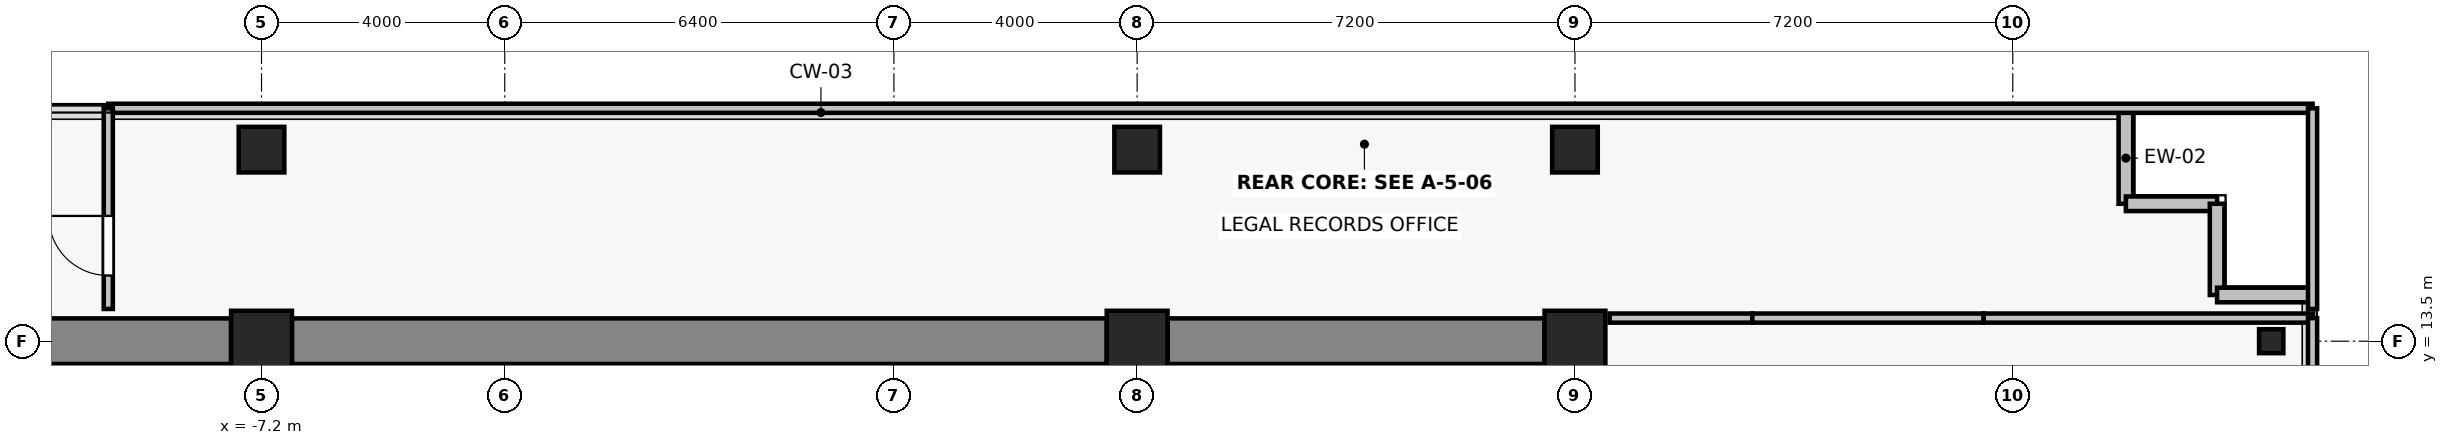
"""IFC4 building model, lengths in metres.
Left out: names, types, materials, properties, quantities, classifications, styles, units other than length and angle.
Written with IfcOpenShell. Run it as: python <this file> out.ifc"""

import sys

from ifc_helpers import new_model, si_unit, direction, frame, frame_2d, origin, origin_2d, place, context, subcontext, project, spatial, rectangle, i_section, extrude, source, transform, mapped, element, fill, save


model = new_model("IFC4")
c1 = context("Model", 3, precision=1e-05, world=origin(), true_north=direction((0.0, 1.0)))
c2 = subcontext(c1, "Body", "Model", "MODEL_VIEW")
j1 = project(units=[si_unit("LENGTHUNIT", "METRE"), si_unit("PLANEANGLEUNIT", "RADIAN")], contexts=[c1])
p1 = place(None, origin())
s1 = spatial("IfcSite", under=j1, at=p1, CompositionType="ELEMENT")
p2 = place(p1, origin())
s2 = spatial("IfcBuilding", under=s1, at=p2, CompositionType="ELEMENT")
p3 = place(p2, frame((0.0, 0.0, 195.7)))
s3 = spatial("IfcBuildingStorey", under=s2, at=p3, CompositionType="ELEMENT", Elevation=195.7)
for number, where, z_axis, x_axis in (
    (1, (-7.2, 13.5, 0.0), (0.0, 0.0, 1.0), (1.0, 0.0, 0.0)),
    (2, (7.2, 13.5, 0.0), (0.0, 0.0, 1.0), (1.0, 0.0, 0.0)),
    (3, (14.4, 13.5, 0.0), (0.0, 0.0, 1.0), (1.0, 0.0, 0.0)),
):
    element("IfcColumn", number, at=place(p3, frame(where, z_axis=z_axis, x_axis=x_axis)), inside=s3, PredefinedType="COLUMN", context=c2, shape_type="SweptSolid", body=[
        extrude(rectangle(XDim=1.0, YDim=1.0, at=origin_2d()), origin(), (0.0, 0.0, 1.0), 3.3),
    ])
for number, where, z_axis, x_axis in (
    (4, (-7.2, 16.65, 0.0), (0.0, 0.0, 1.0), (1.0, 0.0, 0.0)),
    (5, (7.2, 16.65, 0.0), (0.0, 0.0, 1.0), (1.0, 0.0, 0.0)),
    (6, (14.4, 16.65, 0.0), (0.0, 0.0, 1.0), (1.0, 0.0, 0.0)),
):
    element("IfcColumn", number, at=place(p3, frame(where, z_axis=z_axis, x_axis=x_axis)), inside=s3, PredefinedType="COLUMN", context=c2, shape_type="SweptSolid", body=[
        extrude(rectangle(XDim=0.75, YDim=0.75, at=origin_2d()), origin(), (0.0, 0.0, 1.0), 3.3),
    ])
p4 = place(p3, frame((25.85, 13.5, 0.0), z_axis=(0.0, 0.0, 1.0), x_axis=(1.0, 0.0, 0.0)))
e7 = element("IfcColumn", 7, at=p4, inside=s3, PredefinedType="COLUMN", context=c2, shape_type="SweptSolid", body=[
    extrude(i_section(OverallWidth=0.399, OverallDepth=0.394, WebThickness=0.023, FlangeThickness=0.037, FilletRadius=0.015, at=origin_2d()), origin(), (0.0, 0.0, 1.0), 3.3),
])
p5 = place(p3, frame((-13.9, 13.5, 0.0), z_axis=(0.0, 0.0, 1.0), x_axis=(1.0, 0.0, 0.0)))
e8 = element("IfcWall", 8, at=p5, inside=s3, PredefinedType="SHEAR", context=c2, shape_type="SweptSolid", body=[
    extrude(rectangle(XDim=6.2, YDim=0.75, at=frame_2d((3.1, 0.0))), origin(), (0.0, 0.0, 1.0), 3.05),
])
p6 = place(p3, frame((-6.7, 13.5, 0.0), z_axis=(0.0, 0.0, 1.0), x_axis=(1.0, 0.0, 0.0)))
e9 = element("IfcWall", 9, at=p6, inside=s3, PredefinedType="SHEAR", context=c2, shape_type="SweptSolid", body=[
    extrude(rectangle(XDim=13.4, YDim=0.75, at=frame_2d((6.7, 0.0))), origin(), (0.0, 0.0, 1.0), 3.05),
])
p7 = place(p3, frame((7.7, 13.5, 0.0), z_axis=(0.0, 0.0, 1.0), x_axis=(1.0, 0.0, 0.0)))
e10 = element("IfcWall", 10, at=p7, inside=s3, PredefinedType="SHEAR", context=c2, shape_type="SweptSolid", body=[
    extrude(rectangle(XDim=6.2, YDim=0.75, at=frame_2d((3.1, 0.0))), origin(), (0.0, 0.0, 1.0), 3.05),
])
for number, where, z_axis, x_axis in (
    (11, (23.46, 15.76, 0.0), (0.0, 0.0, 1.0), (0.0, 1.0, 0.0)),
    (12, (24.96, 15.76, 0.0), (0.0, 0.0, 1.0), (-1.0, 0.0, 0.0)),
    (13, (24.96, 14.26, 0.0), (0.0, 0.0, 1.0), (0.0, 1.0, 0.0)),
    (14, (26.46, 14.26, 0.0), (0.0, 0.0, 1.0), (-1.0, 0.0, 0.0)),
):
    element("IfcWall", number, at=place(p3, frame(where, z_axis=z_axis, x_axis=x_axis)), inside=s3, PredefinedType="SOLIDWALL", context=c2, shape_type="SweptSolid", body=[
        extrude(rectangle(XDim=1.5, YDim=0.24, at=frame_2d((0.75, 0.0))), origin(), (0.0, 0.0, 1.0), 3.05),
    ])
p8 = place(p3, frame((14.97, 13.88, 0.0), z_axis=(0.0, 0.0, 1.0), x_axis=(1.0, 0.0, 0.0)))
e15 = element("IfcWall", 15, at=p8, inside=s3, PredefinedType="PARTITIONING", context=c2, shape_type="SweptSolid", body=[
    extrude(rectangle(XDim=2.347, YDim=0.15, at=frame_2d((1.173, 0.0))), origin(), (0.0, 0.0, 1.0), 3.05),
])
p9 = place(p3, frame((17.317, 13.88, 0.0), z_axis=(0.0, 0.0, 1.0), x_axis=(1.0, 0.0, 0.0)))
e16 = element("IfcWall", 16, at=p9, inside=s3, PredefinedType="PARTITIONING", context=c2, shape_type="SweptSolid", body=[
    extrude(rectangle(XDim=3.805, YDim=0.15, at=frame_2d((1.902, 0.0))), origin(), (0.0, 0.0, 1.0), 3.05),
])
p10 = place(p3, frame((21.122, 13.88, 0.0), z_axis=(0.0, 0.0, 1.0), x_axis=(1.0, 0.0, 0.0)))
e17 = element("IfcWall", 17, at=p10, inside=s3, PredefinedType="PARTITIONING", context=c2, shape_type="SweptSolid", body=[
    extrude(rectangle(XDim=5.408, YDim=0.15, at=frame_2d((2.704, 0.0))), origin(), (0.0, 0.0, 1.0), 3.05),
])
p11 = place(p3, frame((26.53, 13.88, 0.0), z_axis=(0.0, 0.0, 1.0), x_axis=(0.0, -1.0, 0.0)))
e18 = element("IfcWall", 18, at=p11, inside=s3, PredefinedType="PARTITIONING", context=c2, shape_type="SweptSolid", body=[
    extrude(rectangle(XDim=15.65, YDim=0.15, at=frame_2d((7.825, 0.0))), origin(), (0.0, 0.0, 1.0), 3.05),
])
p12 = place(p3, frame((-9.72, 17.33, 0.0), z_axis=(0.0, 0.0, 1.0), x_axis=(1.0, 0.0, 0.0)))
e19 = element("IfcWall", 19, at=p12, inside=s3, PredefinedType="PARTITIONING", context=c2, shape_type="SweptSolid", body=[
    extrude(rectangle(XDim=36.25, YDim=0.15, at=frame_2d((18.125, 0.0))), origin(), (0.0, 0.0, 1.0), 3.05),
])
p13 = place(p3, frame((-9.72, 14.03, 0.0), z_axis=(0.0, 0.0, 1.0), x_axis=(0.0, 1.0, 0.0)))
e20 = element("IfcWall", 20, at=p13, inside=s3, PredefinedType="PARTITIONING", context=c2, shape_type="SweptSolid", body=[
    extrude(rectangle(XDim=3.3, YDim=0.15, at=frame_2d((1.65, 0.0))), origin(), (0.0, 0.0, 1.0), 2.54),
])
p14 = place(p13, frame((0.55, 0.0, 0.0)))
e21 = element("IfcOpeningElement", 21, at=p14, cuts=e20, PredefinedType="OPENING", context=c2, shape_type="SweptSolid", body=[
    extrude(rectangle(XDim=0.98, YDim=2.15, at=frame_2d((0.49, 1.075))), frame((0.0, 0.085, 0.0), z_axis=(0.0, -1.0, 0.0), x_axis=(1.0, 0.0, 0.0)), (0.0, 0.0, 1.0), 0.17),
])
p15 = place(p3, frame((26.53, 17.33, 0.0), z_axis=(0.0, 0.0, 1.0), x_axis=(0.0, -1.0, 0.0)))
e22 = element("IfcWall", 22, at=p15, inside=s3, PredefinedType="PARTITIONING", context=c2, shape_type="SweptSolid", body=[
    extrude(rectangle(XDim=3.3, YDim=0.15, at=frame_2d((1.65, 0.0))), origin(), (0.0, 0.0, 1.0), 3.05),
])
m1 = source(origin(), c2, "Body", "SweptSolid", [
    extrude(rectangle(XDim=0.98, YDim=2.15, at=frame_2d((0.49, 1.075))), frame((0.0, 0.025, 0.0), z_axis=(0.0, -1.0, 0.0), x_axis=(1.0, 0.0, 0.0)), (0.0, 0.0, 1.0), 0.05),
])
p16 = place(p14, origin())
e23 = element("IfcDoor", 23, at=p16, inside=s3, OperationType="SINGLE_SWING_RIGHT", PredefinedType="DOOR", context=c2, shape_type="MappedRepresentation", body=[
    mapped(m1, transform((0.0, 0.0, 0.0), x_axis=(1.0, 0.0, 0.0), y_axis=(0.0, 1.0, 0.0), z_axis=(0.0, 0.0, 1.0), scale=1.0)),
])
fill(e21, e23)
save(model, sys.argv[1])
